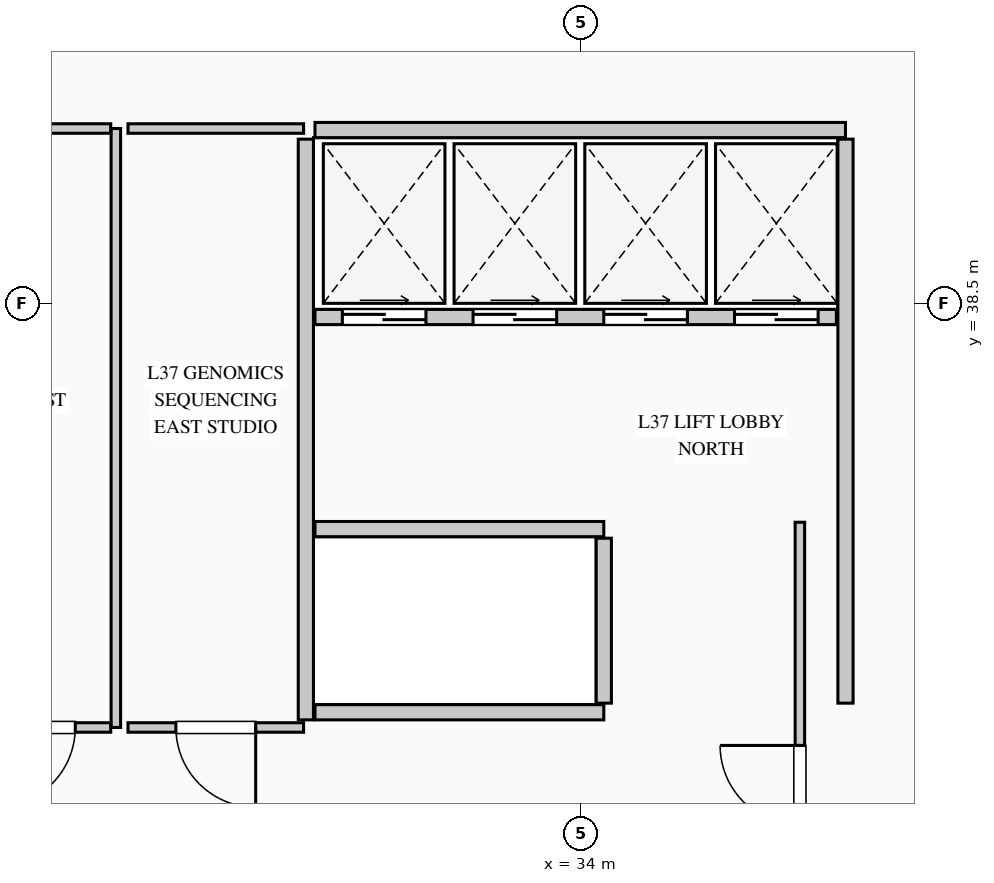
"""IFC4 building model, lengths in metres.
Left out: names, types, materials, properties, quantities, classifications, styles, units other than length and angle.
Written with IfcOpenShell. Run it as: python <this file> out.ifc"""

import sys

from ifc_helpers import new_model, si_unit, direction, frame, frame_2d, origin, place, context, subcontext, project, spatial, rectangle, extrude, element, fill, save


model = new_model("IFC4")
c1 = context("Model", 3, precision=1e-05, world=origin(), true_north=direction((0.0, 1.0)))
c2 = subcontext(c1, "Body", "Model", "MODEL_VIEW")
j1 = project(units=[si_unit("LENGTHUNIT", "METRE"), si_unit("PLANEANGLEUNIT", "RADIAN")], contexts=[c1])
p1 = place(None, origin())
s1 = spatial("IfcSite", under=j1, at=p1, CompositionType="ELEMENT")
p2 = place(p1, origin())
s2 = spatial("IfcBuilding", under=s1, at=p2, CompositionType="ELEMENT")
p3 = place(p2, frame((0.0, 0.0, 158.8)))
s3 = spatial("IfcBuildingStorey", under=s2, at=p3, CompositionType="ELEMENT", Elevation=158.8)
p4 = place(p3, frame((30.38, 33.02, 0.0), z_axis=(0.0, 0.0, 1.0), x_axis=(0.0, 1.0, 0.0)))
e1 = element("IfcWall", 1, at=p4, inside=s3, PredefinedType="PARTITIONING", context=c2, shape_type="SweptSolid", body=[
    extrude(rectangle(XDim=7.64, YDim=0.2, at=frame_2d((3.82, 0.0))), origin(), (0.0, 0.0, 1.0), 3.69),
])
p5 = place(p3, frame((30.5, 40.78, 0.0), z_axis=(0.0, 0.0, 1.0), x_axis=(1.0, 0.0, 0.0)))
e2 = element("IfcWall", 2, at=p5, inside=s3, PredefinedType="PARTITIONING", context=c2, shape_type="SweptSolid", body=[
    extrude(rectangle(XDim=6.98, YDim=0.2, at=frame_2d((3.49, 0.0))), origin(), (0.0, 0.0, 1.0), 3.69),
])
p6 = place(p3, frame((37.48, 33.24, 0.0), z_axis=(0.0, 0.0, 1.0), x_axis=(0.0, 1.0, 0.0)))
e3 = element("IfcWall", 3, at=p6, inside=s3, PredefinedType="PARTITIONING", context=c2, shape_type="SweptSolid", body=[
    extrude(rectangle(XDim=7.42, YDim=0.2, at=frame_2d((3.71, 0.0))), origin(), (0.0, 0.0, 1.0), 3.69),
])
p7 = place(p3, frame((30.5, 38.32, 0.0), z_axis=(0.0, 0.0, 1.0), x_axis=(1.0, 0.0, 0.0)))
e4 = element("IfcWall", 4, at=p7, inside=s3, PredefinedType="PARTITIONING", context=c2, shape_type="SweptSolid", body=[
    extrude(rectangle(XDim=6.86, YDim=0.2, at=frame_2d((3.43, 0.0))), origin(), (0.0, 0.0, 1.0), 3.69),
])
p8 = place(p7, frame((0.36, 0.0, 0.0)))
e5 = element("IfcOpeningElement", 5, at=p8, cuts=e4, PredefinedType="OPENING", context=c2, shape_type="SweptSolid", body=[
    extrude(rectangle(XDim=1.1, YDim=2.2, at=frame_2d((0.55, 1.1))), frame((0.0, 0.11, 0.0), z_axis=(0.0, -1.0, 0.0), x_axis=(1.0, 0.0, 0.0)), (0.0, 0.0, 1.0), 0.22),
])
p9 = place(p7, frame((2.08, 0.0, 0.0)))
e6 = element("IfcOpeningElement", 6, at=p9, cuts=e4, PredefinedType="OPENING", context=c2, shape_type="SweptSolid", body=[
    extrude(rectangle(XDim=1.1, YDim=2.2, at=frame_2d((0.55, 1.1))), frame((0.0, 0.11, 0.0), z_axis=(0.0, -1.0, 0.0), x_axis=(1.0, 0.0, 0.0)), (0.0, 0.0, 1.0), 0.22),
])
p10 = place(p7, frame((3.8, 0.0, 0.0)))
e7 = element("IfcOpeningElement", 7, at=p10, cuts=e4, PredefinedType="OPENING", context=c2, shape_type="SweptSolid", body=[
    extrude(rectangle(XDim=1.1, YDim=2.2, at=frame_2d((0.55, 1.1))), frame((0.0, 0.11, 0.0), z_axis=(0.0, -1.0, 0.0), x_axis=(1.0, 0.0, 0.0)), (0.0, 0.0, 1.0), 0.22),
])
p11 = place(p7, frame((5.52, 0.0, 0.0)))
e8 = element("IfcOpeningElement", 8, at=p11, cuts=e4, PredefinedType="OPENING", context=c2, shape_type="SweptSolid", body=[
    extrude(rectangle(XDim=1.1, YDim=2.2, at=frame_2d((0.55, 1.1))), frame((0.0, 0.11, 0.0), z_axis=(0.0, -1.0, 0.0), x_axis=(1.0, 0.0, 0.0)), (0.0, 0.0, 1.0), 0.22),
])
for number, where, z_axis, x_axis in (
    (9, (30.5, 35.53, 0.0), (0.0, 0.0, 1.0), (1.0, 0.0, 0.0)),
    (10, (30.5, 33.12, 0.0), (0.0, 0.0, 1.0), (1.0, 0.0, 0.0)),
):
    element("IfcWall", number, at=place(p3, frame(where, z_axis=z_axis, x_axis=x_axis)), inside=s3, PredefinedType="PARTITIONING", context=c2, shape_type="SweptSolid", body=[
        extrude(rectangle(XDim=3.8, YDim=0.2, at=frame_2d((1.9, 0.0))), origin(), (0.0, 0.0, 1.0), 3.69),
    ])
p12 = place(p3, frame((34.3, 33.24, 0.0), z_axis=(0.0, 0.0, 1.0), x_axis=(0.0, 1.0, 0.0)))
e11 = element("IfcWall", 11, at=p12, inside=s3, PredefinedType="PARTITIONING", context=c2, shape_type="SweptSolid", body=[
    extrude(rectangle(XDim=2.17, YDim=0.2, at=frame_2d((1.085, 0.0))), origin(), (0.0, 0.0, 1.0), 3.69),
])
p13 = place(p3, frame((27.88, 40.8, 0.0), z_axis=(0.0, 0.0, 1.0), x_axis=(0.0, -1.0, 0.0)))
e12 = element("IfcWall", 12, at=p13, inside=s3, PredefinedType="PARTITIONING", context=c2, shape_type="SweptSolid", body=[
    extrude(rectangle(XDim=7.88, YDim=0.125, at=frame_2d((3.94, 0.0))), origin(), (0.0, 0.0, 1.0), 3.69),
])
p14 = place(p3, frame((27.812, 32.92, 0.0), z_axis=(0.0, 0.0, 1.0), x_axis=(-1.0, 0.0, 0.0)))
e13 = element("IfcWall", 13, at=p14, inside=s3, PredefinedType="PARTITIONING", context=c2, shape_type="SweptSolid", body=[
    extrude(rectangle(XDim=3.762, YDim=0.125, at=frame_2d((1.881, 0.0))), origin(), (0.0, 0.0, 1.0), 3.69),
])
p15 = place(p14, frame((0.466, 0.0, 0.0)))
e14 = element("IfcOpeningElement", 14, at=p15, cuts=e13, PredefinedType="OPENING", context=c2, shape_type="SweptSolid", body=[
    extrude(rectangle(XDim=1.05, YDim=2.15, at=frame_2d((0.525, 1.075))), frame((0.0, 0.073, 0.0), z_axis=(0.0, -1.0, 0.0), x_axis=(1.0, 0.0, 0.0)), (0.0, 0.0, 1.0), 0.145),
])
p16 = place(p3, frame((24.117, 40.8, 0.0), z_axis=(0.0, 0.0, 1.0), x_axis=(1.0, 0.0, 0.0)))
e15 = element("IfcWall", 15, at=p16, inside=s3, PredefinedType="PARTITIONING", context=c2, shape_type="SweptSolid", body=[
    extrude(rectangle(XDim=3.695, YDim=0.125, at=frame_2d((1.848, 0.0))), origin(), (0.0, 0.0, 1.0), 3.69),
])
p17 = place(p3, frame((30.35, 32.92, 0.0), z_axis=(0.0, 0.0, 1.0), x_axis=(-1.0, 0.0, 0.0)))
e16 = element("IfcWall", 16, at=p17, inside=s3, PredefinedType="PARTITIONING", context=c2, shape_type="SweptSolid", body=[
    extrude(rectangle(XDim=2.31, YDim=0.125, at=frame_2d((1.155, 0.0))), origin(), (0.0, 0.0, 1.0), 3.69),
])
p18 = place(p17, frame((0.63, 0.0, 0.0)))
e17 = element("IfcOpeningElement", 17, at=p18, cuts=e16, PredefinedType="OPENING", context=c2, shape_type="SweptSolid", body=[
    extrude(rectangle(XDim=1.05, YDim=2.15, at=frame_2d((0.525, 1.075))), frame((0.0, 0.073, 0.0), z_axis=(0.0, -1.0, 0.0), x_axis=(1.0, 0.0, 0.0)), (0.0, 0.0, 1.0), 0.145),
])
p19 = place(p3, frame((28.04, 40.8, 0.0), z_axis=(0.0, 0.0, 1.0), x_axis=(1.0, 0.0, 0.0)))
e18 = element("IfcWall", 18, at=p19, inside=s3, PredefinedType="PARTITIONING", context=c2, shape_type="SweptSolid", body=[
    extrude(rectangle(XDim=2.31, YDim=0.125, at=frame_2d((1.155, 0.0))), origin(), (0.0, 0.0, 1.0), 3.69),
])
p20 = place(p3, frame((36.88, 28.698, 0.0), z_axis=(0.0, 0.0, 1.0), x_axis=(0.0, 1.0, 0.0)))
e19 = element("IfcWall", 19, at=p20, inside=s3, PredefinedType="PARTITIONING", context=c2, shape_type="SweptSolid", body=[
    extrude(rectangle(XDim=6.923, YDim=0.125, at=frame_2d((3.461, 0.0))), origin(), (0.0, 0.0, 1.0), 3.69),
])
p21 = place(p20, frame((2.936, 0.0, 0.0)))
e20 = element("IfcOpeningElement", 20, at=p21, cuts=e19, PredefinedType="OPENING", context=c2, shape_type="SweptSolid", body=[
    extrude(rectangle(XDim=1.05, YDim=2.15, at=frame_2d((0.525, 1.075))), frame((0.0, 0.073, 0.0), z_axis=(0.0, -1.0, 0.0), x_axis=(1.0, 0.0, 0.0)), (0.0, 0.0, 1.0), 0.145),
])
p22 = place(p8, origin())
e21 = element("IfcDoor", 21, at=p22, inside=s3, OperationType="DOUBLE_DOOR_SLIDING", PredefinedType="DOOR", context=c2, shape_type="SweptSolid", body=[
    extrude(rectangle(XDim=1.1, YDim=2.2, at=frame_2d((0.55, 1.1))), frame((0.0, 0.025, 0.0), z_axis=(0.0, -1.0, 0.0), x_axis=(1.0, 0.0, 0.0)), (0.0, 0.0, 1.0), 0.05),
])
fill(e5, e21)
p23 = place(p9, origin())
e22 = element("IfcDoor", 22, at=p23, inside=s3, OperationType="DOUBLE_DOOR_SLIDING", PredefinedType="DOOR", context=c2, shape_type="SweptSolid", body=[
    extrude(rectangle(XDim=1.1, YDim=2.2, at=frame_2d((0.55, 1.1))), frame((0.0, 0.025, 0.0), z_axis=(0.0, -1.0, 0.0), x_axis=(1.0, 0.0, 0.0)), (0.0, 0.0, 1.0), 0.05),
])
fill(e6, e22)
p24 = place(p10, origin())
e23 = element("IfcDoor", 23, at=p24, inside=s3, OperationType="DOUBLE_DOOR_SLIDING", PredefinedType="DOOR", context=c2, shape_type="SweptSolid", body=[
    extrude(rectangle(XDim=1.1, YDim=2.2, at=frame_2d((0.55, 1.1))), frame((0.0, 0.025, 0.0), z_axis=(0.0, -1.0, 0.0), x_axis=(1.0, 0.0, 0.0)), (0.0, 0.0, 1.0), 0.05),
])
fill(e7, e23)
p25 = place(p11, origin())
e24 = element("IfcDoor", 24, at=p25, inside=s3, OperationType="DOUBLE_DOOR_SLIDING", PredefinedType="DOOR", context=c2, shape_type="SweptSolid", body=[
    extrude(rectangle(XDim=1.1, YDim=2.2, at=frame_2d((0.55, 1.1))), frame((0.0, 0.025, 0.0), z_axis=(0.0, -1.0, 0.0), x_axis=(1.0, 0.0, 0.0)), (0.0, 0.0, 1.0), 0.05),
])
fill(e8, e24)
p26 = place(p15, origin())
e25 = element("IfcDoor", 25, at=p26, inside=s3, OperationType="SINGLE_SWING_RIGHT", PredefinedType="DOOR", context=c2, shape_type="SweptSolid", body=[
    extrude(rectangle(XDim=1.05, YDim=2.15, at=frame_2d((0.525, 1.075))), frame((0.0, 0.025, 0.0), z_axis=(0.0, -1.0, 0.0), x_axis=(1.0, 0.0, 0.0)), (0.0, 0.0, 1.0), 0.05),
])
fill(e14, e25)
p27 = place(p18, origin())
e26 = element("IfcDoor", 26, at=p27, inside=s3, OperationType="SINGLE_SWING_LEFT", PredefinedType="DOOR", context=c2, shape_type="SweptSolid", body=[
    extrude(rectangle(XDim=1.05, YDim=2.15, at=frame_2d((0.525, 1.075))), frame((0.0, 0.025, 0.0), z_axis=(0.0, -1.0, 0.0), x_axis=(1.0, 0.0, 0.0)), (0.0, 0.0, 1.0), 0.05),
])
fill(e17, e26)
p28 = place(p21, origin())
e27 = element("IfcDoor", 27, at=p28, inside=s3, OperationType="SINGLE_SWING_RIGHT", PredefinedType="DOOR", context=c2, shape_type="SweptSolid", body=[
    extrude(rectangle(XDim=1.05, YDim=2.15, at=frame_2d((0.525, 1.075))), frame((0.0, 0.025, 0.0), z_axis=(0.0, -1.0, 0.0), x_axis=(1.0, 0.0, 0.0)), (0.0, 0.0, 1.0), 0.05),
])
fill(e20, e27)
save(model, sys.argv[1])
